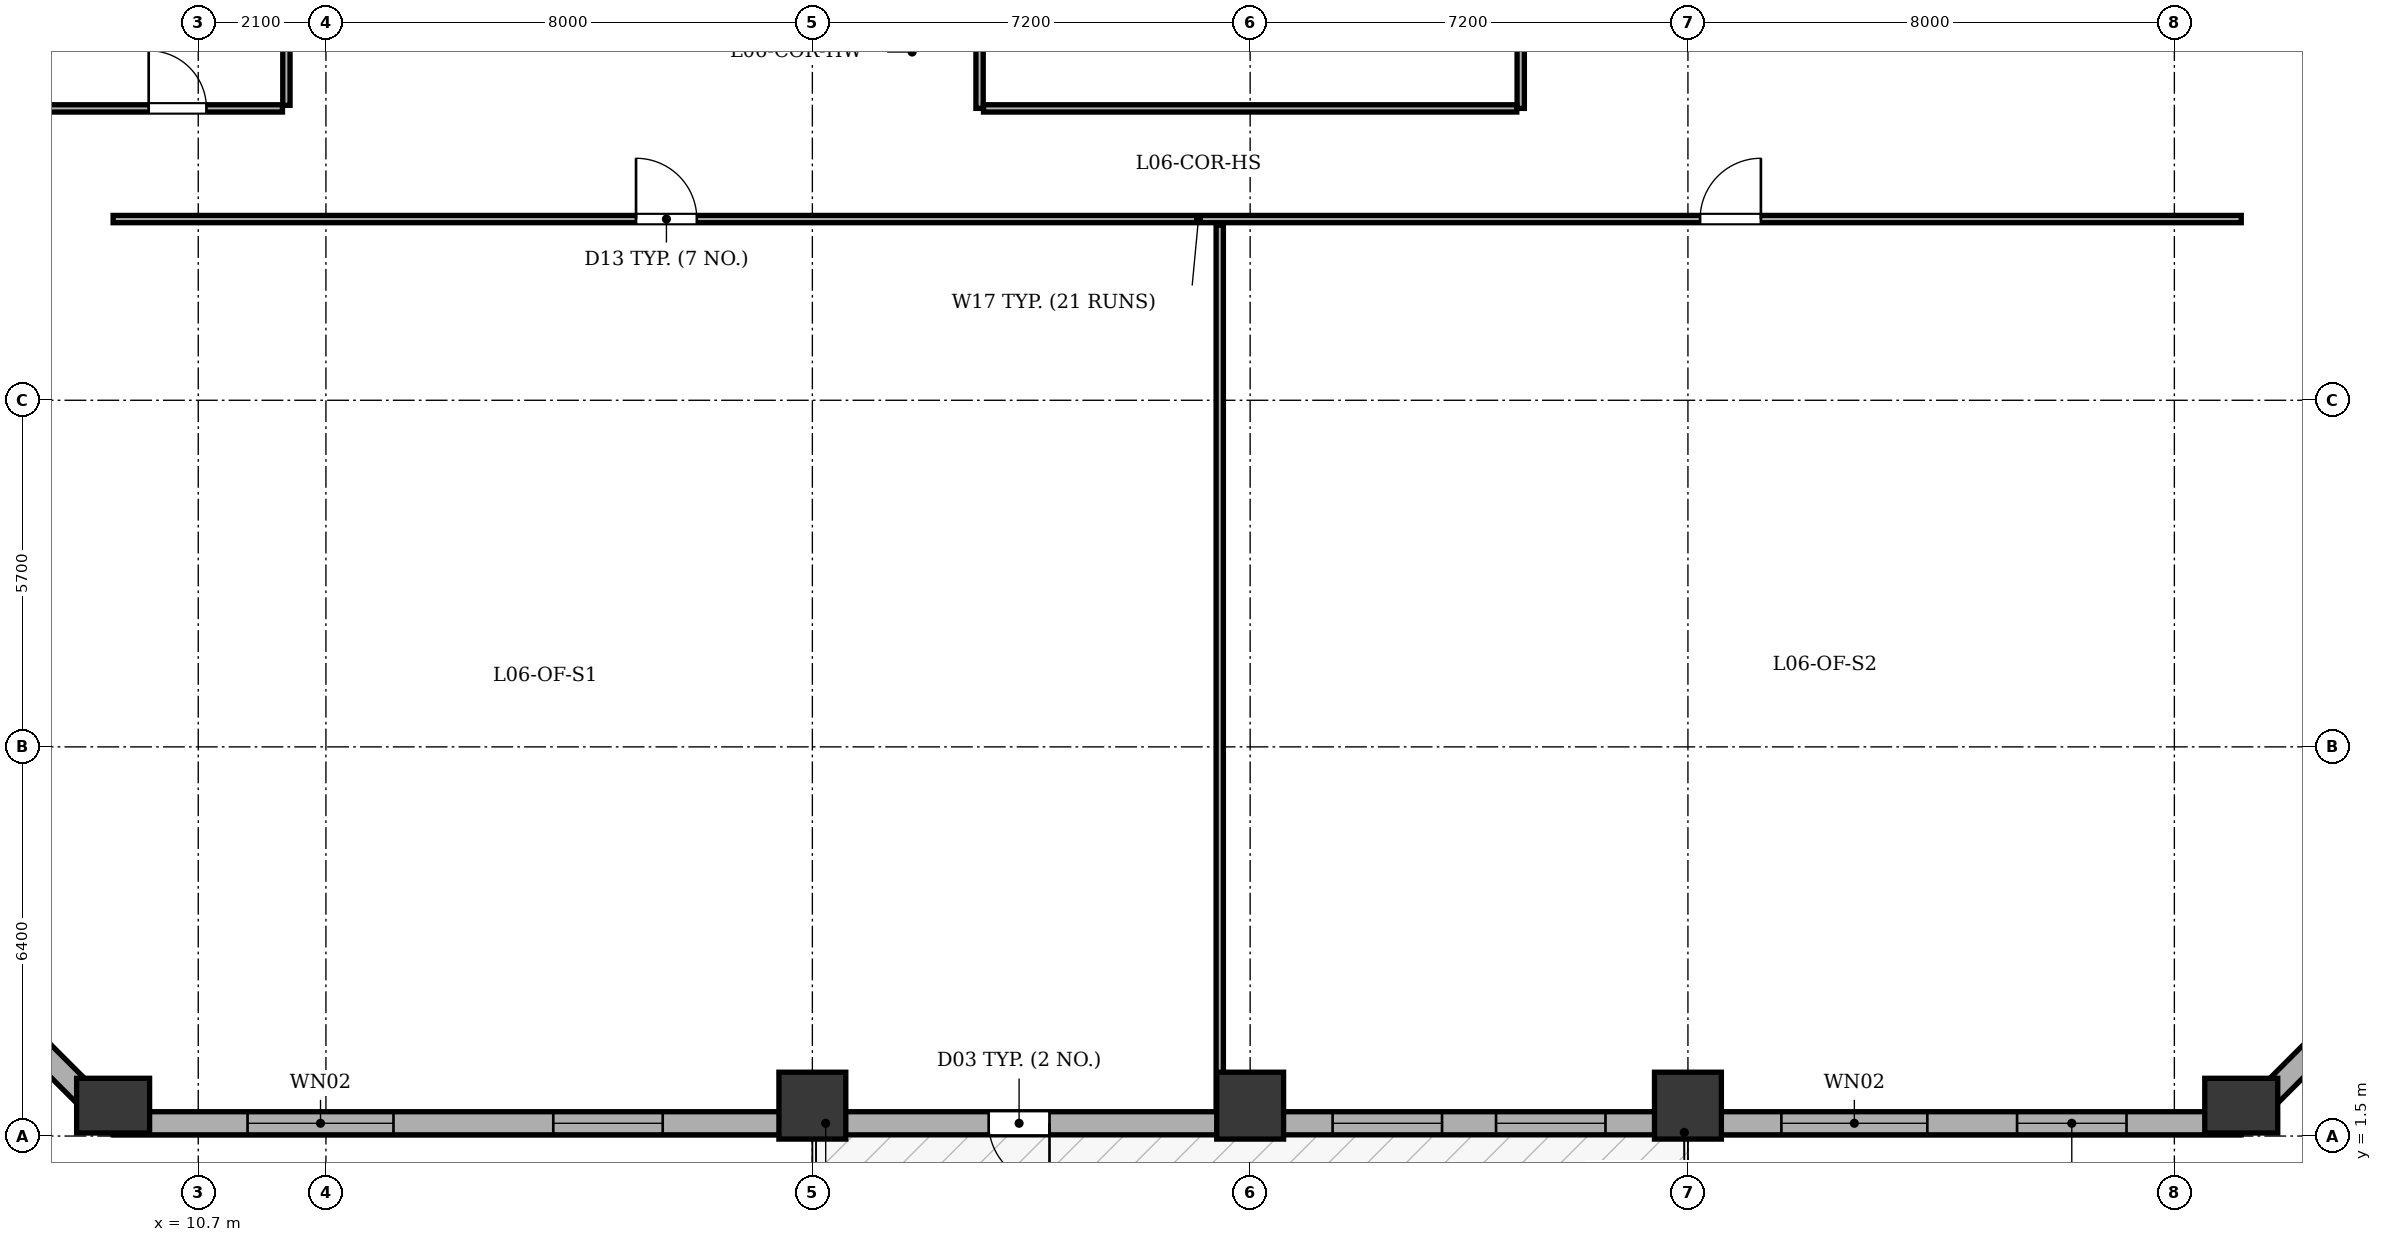
"""IFC4 building model, lengths in metres.
Left out: names, types, materials, properties, quantities, classifications, styles, units other than length and angle.
Written with IfcOpenShell. Run it as: python <this file> out.ifc"""

import sys

from ifc_helpers import new_model, si_unit, direction, frame, frame_2d, origin, origin_2d, place, context, subcontext, project, spatial, rectangle, extrude, element, fill, save


model = new_model("IFC4")
c1 = context("Model", 3, precision=1e-05, world=origin(), true_north=direction((0.0, 1.0)))
c2 = subcontext(c1, "Body", "Model", "MODEL_VIEW")
j1 = project(units=[si_unit("LENGTHUNIT", "METRE"), si_unit("PLANEANGLEUNIT", "RADIAN")], contexts=[c1])
p1 = place(None, origin())
s1 = spatial("IfcSite", under=j1, at=p1, CompositionType="ELEMENT")
p2 = place(p1, origin())
s2 = spatial("IfcBuilding", under=s1, at=p2, CompositionType="ELEMENT")
p3 = place(p2, frame((0.0, 0.0, 28.2)))
s3 = spatial("IfcBuildingStorey", under=s2, at=p3, CompositionType="ELEMENT", Elevation=28.2)
p4 = place(p3, frame((9.3, 2.0, 0.0), z_axis=(0.0, 0.0, 1.0), x_axis=(1.0, 0.0, 0.0)))
e1 = element("IfcColumn", 1, at=p4, inside=s3, PredefinedType="COLUMN", context=c2, shape_type="SweptSolid", body=[
    extrude(rectangle(XDim=0.9, YDim=1.2, at=origin_2d()), origin(), (0.0, 0.0, 1.0), 3.9),
])
for number, where, z_axis, x_axis in (
    (2, (20.8, 2.0, 0.0), (0.0, 0.0, 1.0), (1.0, 0.0, 0.0)),
    (3, (28.0, 2.0, 0.0), (0.0, 0.0, 1.0), (1.0, 0.0, 0.0)),
    (4, (35.2, 2.0, 0.0), (0.0, 0.0, 1.0), (1.0, 0.0, 0.0)),
):
    element("IfcColumn", number, at=place(p3, frame(where, z_axis=z_axis, x_axis=x_axis)), inside=s3, PredefinedType="COLUMN", context=c2, shape_type="SweptSolid", body=[
        extrude(rectangle(XDim=1.1, YDim=1.1, at=origin_2d()), origin(), (0.0, 0.0, 1.0), 3.9),
    ])
p5 = place(p3, frame((44.3, 2.0, 0.0), z_axis=(0.0, 0.0, 1.0), x_axis=(1.0, 0.0, 0.0)))
e5 = element("IfcColumn", 5, at=p5, inside=s3, PredefinedType="COLUMN", context=c2, shape_type="SweptSolid", body=[
    extrude(rectangle(XDim=0.9, YDim=1.2, at=origin_2d()), origin(), (0.0, 0.0, 1.0), 3.9),
])
p6 = place(p3, frame((44.3, 1.71, 0.0), z_axis=(0.0, 0.0, 1.0), x_axis=(-1.0, 0.0, 0.0)))
e6 = element("IfcWall", 6, at=p6, inside=s3, PredefinedType="STANDARD", context=c2, shape_type="SweptSolid", body=[
    extrude(rectangle(XDim=35.0, YDim=0.38, at=frame_2d((17.5, 0.0))), origin(), (0.0, 0.0, 1.0), 3.135),
])
p7 = place(p6, frame((19.6, 0.0, 0.0)))
e7 = element("IfcOpeningElement", 7, at=p7, cuts=e6, PredefinedType="OPENING", context=c2, shape_type="SweptSolid", body=[
    extrude(rectangle(XDim=1.0, YDim=2.02, at=frame_2d((0.5, 1.01))), frame((0.0, 0.2, 0.0), z_axis=(0.0, -1.0, 0.0), x_axis=(1.0, 0.0, 0.0)), (0.0, 0.0, 1.0), 0.4),
])
p8 = place(p6, frame((1.887, 0.0, 0.8)))
e8 = element("IfcOpeningElement", 8, at=p8, cuts=e6, PredefinedType="OPENING", context=c2, shape_type="SweptSolid", body=[
    extrude(rectangle(XDim=1.8, YDim=1.9, at=frame_2d((0.9, 0.95))), frame((0.0, 0.2, 0.0), z_axis=(0.0, -1.0, 0.0), x_axis=(1.0, 0.0, 0.0)), (0.0, 0.0, 1.0), 0.4),
])
p9 = place(p6, frame((5.163, 0.0, 0.8)))
e9 = element("IfcOpeningElement", 9, at=p9, cuts=e6, PredefinedType="OPENING", context=c2, shape_type="SweptSolid", body=[
    extrude(rectangle(XDim=2.4, YDim=1.9, at=frame_2d((1.2, 0.95))), frame((0.0, 0.2, 0.0), z_axis=(0.0, -1.0, 0.0), x_axis=(1.0, 0.0, 0.0)), (0.0, 0.0, 1.0), 0.4),
])
p10 = place(p6, frame((10.456, 0.0, 0.8)))
e10 = element("IfcOpeningElement", 10, at=p10, cuts=e6, PredefinedType="OPENING", context=c2, shape_type="SweptSolid", body=[
    extrude(rectangle(XDim=1.8, YDim=1.9, at=frame_2d((0.9, 0.95))), frame((0.0, 0.2, 0.0), z_axis=(0.0, -1.0, 0.0), x_axis=(1.0, 0.0, 0.0)), (0.0, 0.0, 1.0), 0.4),
])
p11 = place(p6, frame((13.144, 0.0, 0.8)))
e11 = element("IfcOpeningElement", 11, at=p11, cuts=e6, PredefinedType="OPENING", context=c2, shape_type="SweptSolid", body=[
    extrude(rectangle(XDim=1.8, YDim=1.9, at=frame_2d((0.9, 0.95))), frame((0.0, 0.2, 0.0), z_axis=(0.0, -1.0, 0.0), x_axis=(1.0, 0.0, 0.0)), (0.0, 0.0, 1.0), 0.4),
])
p12 = place(p6, frame((25.961, 0.0, 0.8)))
e12 = element("IfcOpeningElement", 12, at=p12, cuts=e6, PredefinedType="OPENING", context=c2, shape_type="SweptSolid", body=[
    extrude(rectangle(XDim=1.8, YDim=1.9, at=frame_2d((0.9, 0.95))), frame((0.0, 0.2, 0.0), z_axis=(0.0, -1.0, 0.0), x_axis=(1.0, 0.0, 0.0)), (0.0, 0.0, 1.0), 0.4),
])
p13 = place(p6, frame((30.389, 0.0, 0.8)))
e13 = element("IfcOpeningElement", 13, at=p13, cuts=e6, PredefinedType="OPENING", context=c2, shape_type="SweptSolid", body=[
    extrude(rectangle(XDim=2.4, YDim=1.9, at=frame_2d((1.2, 0.95))), frame((0.0, 0.2, 0.0), z_axis=(0.0, -1.0, 0.0), x_axis=(1.0, 0.0, 0.0)), (0.0, 0.0, 1.0), 0.4),
])
p14 = place(p3, frame((9.3, 1.71, 0.0), z_axis=(0.0, 0.0, 1.0), x_axis=(-0.707106781187, 0.707106781187, 0.0)))
e14 = element("IfcWall", 14, at=p14, inside=s3, PredefinedType="STANDARD", context=c2, shape_type="SweptSolid", body=[
    extrude(rectangle(XDim=6.774, YDim=0.38, at=frame_2d((3.387, 0.0))), origin(), (0.0, 0.0, 1.0), 3.135),
])
p15 = place(p14, frame((2.687, 0.0, 0.8)))
e15 = element("IfcOpeningElement", 15, at=p15, cuts=e14, PredefinedType="OPENING", context=c2, shape_type="SweptSolid", body=[
    extrude(rectangle(XDim=1.4, YDim=1.65, at=frame_2d((0.7, 0.825))), frame((0.0, 0.2, 0.0), z_axis=(0.0, -1.0, 0.0), x_axis=(1.0, 0.0, 0.0)), (0.0, 0.0, 1.0), 0.4),
])
p16 = place(p3, frame((49.09, 6.5, 0.0), z_axis=(0.0, 0.0, 1.0), x_axis=(-0.707106781187, -0.707106781187, 0.0)))
e16 = element("IfcWall", 16, at=p16, inside=s3, PredefinedType="STANDARD", context=c2, shape_type="SweptSolid", body=[
    extrude(rectangle(XDim=6.774, YDim=0.38, at=frame_2d((3.387, 0.0))), origin(), (0.0, 0.0, 1.0), 3.135),
])
p17 = place(p16, frame((2.687, 0.0, 0.8)))
e17 = element("IfcOpeningElement", 17, at=p17, cuts=e16, PredefinedType="OPENING", context=c2, shape_type="SweptSolid", body=[
    extrude(rectangle(XDim=1.4, YDim=1.65, at=frame_2d((0.7, 0.825))), frame((0.0, 0.2, 0.0), z_axis=(0.0, -1.0, 0.0), x_axis=(1.0, 0.0, 0.0)), (0.0, 0.0, 1.0), 0.4),
])
for number, where, z_axis, x_axis in (
    (18, (23.55, 18.4, 0.0), (0.0, 0.0, 1.0), (0.0, 1.0, 0.0)),
    (19, (32.45, 18.4, 0.0), (0.0, 0.0, 1.0), (0.0, 1.0, 0.0)),
):
    element("IfcWall", number, at=place(p3, frame(where, z_axis=z_axis, x_axis=x_axis)), inside=s3, PredefinedType="PARTITIONING", context=c2, shape_type="SweptSolid", body=[
        extrude(rectangle(XDim=3.485, YDim=0.12, at=frame_2d((1.743, 0.0))), origin(), (0.0, 0.0, 1.0), 3.6),
    ])
p18 = place(p3, frame((23.615, 18.4, 0.0), z_axis=(0.0, 0.0, 1.0), x_axis=(1.0, 0.0, 0.0)))
e20 = element("IfcWall", 20, at=p18, inside=s3, PredefinedType="PARTITIONING", context=c2, shape_type="SweptSolid", body=[
    extrude(rectangle(XDim=8.77, YDim=0.12, at=frame_2d((4.385, 0.0))), origin(), (0.0, 0.0, 1.0), 3.6),
])
p19 = place(p3, frame((9.3, 16.58, 0.0), z_axis=(0.0, 0.0, 1.0), x_axis=(1.0, 0.0, 0.0)))
e21 = element("IfcWall", 21, at=p19, inside=s3, PredefinedType="PARTITIONING", context=c2, shape_type="SweptSolid", body=[
    extrude(rectangle(XDim=35.0, YDim=0.12, at=frame_2d((17.5, 0.0))), origin(), (0.0, 0.0, 1.0), 3.6),
])
p20 = place(p19, frame((8.6, 0.0, 0.0)))
e22 = element("IfcOpeningElement", 22, at=p20, cuts=e21, PredefinedType="OPENING", context=c2, shape_type="SweptSolid", body=[
    extrude(rectangle(XDim=1.0, YDim=2.1, at=frame_2d((0.5, 1.05))), frame((0.0, 0.07, 0.0), z_axis=(0.0, -1.0, 0.0), x_axis=(1.0, 0.0, 0.0)), (0.0, 0.0, 1.0), 0.14),
])
p21 = place(p19, frame((26.1, 0.0, 0.0)))
e23 = element("IfcOpeningElement", 23, at=p21, cuts=e21, PredefinedType="OPENING", context=c2, shape_type="SweptSolid", body=[
    extrude(rectangle(XDim=1.0, YDim=2.1, at=frame_2d((0.5, 1.05))), frame((0.0, 0.07, 0.0), z_axis=(0.0, -1.0, 0.0), x_axis=(1.0, 0.0, 0.0)), (0.0, 0.0, 1.0), 0.14),
])
p22 = place(p3, frame((27.5, 1.905, 0.0), z_axis=(0.0, 0.0, 1.0), x_axis=(0.0, 1.0, 0.0)))
e24 = element("IfcWall", 24, at=p22, inside=s3, PredefinedType="PARTITIONING", context=c2, shape_type="SweptSolid", body=[
    extrude(rectangle(XDim=14.575, YDim=0.12, at=frame_2d((7.288, 0.0))), origin(), (0.0, 0.0, 1.0), 3.6),
])
p23 = place(p3, frame((12.15, 18.45, 0.0), z_axis=(0.0, 0.0, 1.0), x_axis=(0.0, 1.0, 0.0)))
e25 = element("IfcWall", 25, at=p23, inside=s3, PredefinedType="PARTITIONING", context=c2, shape_type="SweptSolid", body=[
    extrude(rectangle(XDim=17.5, YDim=0.12, at=frame_2d((8.75, 0.0))), origin(), (0.0, 0.0, 1.0), 3.6),
])
p24 = place(p3, frame((4.705, 18.4, 0.0), z_axis=(0.0, 0.0, 1.0), x_axis=(1.0, 0.0, 0.0)))
e26 = element("IfcWall", 26, at=p24, inside=s3, PredefinedType="PARTITIONING", context=c2, shape_type="SweptSolid", body=[
    extrude(rectangle(XDim=7.38, YDim=0.12, at=frame_2d((3.69, 0.0))), origin(), (0.0, 0.0, 1.0), 3.6),
])
p25 = place(p24, frame((5.18, 0.0, 0.0)))
e27 = element("IfcOpeningElement", 27, at=p25, cuts=e26, PredefinedType="OPENING", context=c2, shape_type="SweptSolid", body=[
    extrude(rectangle(XDim=0.95, YDim=2.1, at=frame_2d((0.475, 1.05))), frame((0.0, 0.07, 0.0), z_axis=(0.0, -1.0, 0.0), x_axis=(1.0, 0.0, 0.0)), (0.0, 0.0, 1.0), 0.14),
])
p26 = place(p7, origin())
e28 = element("IfcDoor", 28, at=p26, inside=s3, OperationType="SINGLE_SWING_LEFT", PredefinedType="DOOR", context=c2, shape_type="SweptSolid", body=[
    extrude(rectangle(XDim=1.0, YDim=2.02, at=frame_2d((0.5, 1.01))), frame((0.0, 0.025, 0.0), z_axis=(0.0, -1.0, 0.0), x_axis=(1.0, 0.0, 0.0)), (0.0, 0.0, 1.0), 0.05),
])
fill(e7, e28)
p27 = place(p8, origin())
e29 = element("IfcWindow", 29, at=p27, inside=s3, PartitioningType="SINGLE_PANEL", PredefinedType="WINDOW", context=c2, shape_type="SweptSolid", body=[
    extrude(rectangle(XDim=1.8, YDim=1.9, at=frame_2d((0.9, 0.95))), frame((0.0, -0.01, 0.0), z_axis=(0.0, -1.0, 0.0), x_axis=(1.0, 0.0, 0.0)), (0.0, 0.0, 1.0), 0.06),
])
fill(e8, e29)
p28 = place(p9, origin())
e30 = element("IfcWindow", 30, at=p28, inside=s3, PartitioningType="SINGLE_PANEL", PredefinedType="WINDOW", context=c2, shape_type="SweptSolid", body=[
    extrude(rectangle(XDim=2.4, YDim=1.9, at=frame_2d((1.2, 0.95))), frame((0.0, -0.01, 0.0), z_axis=(0.0, -1.0, 0.0), x_axis=(1.0, 0.0, 0.0)), (0.0, 0.0, 1.0), 0.06),
])
fill(e9, e30)
p29 = place(p10, origin())
e31 = element("IfcWindow", 31, at=p29, inside=s3, PartitioningType="SINGLE_PANEL", PredefinedType="WINDOW", context=c2, shape_type="SweptSolid", body=[
    extrude(rectangle(XDim=1.8, YDim=1.9, at=frame_2d((0.9, 0.95))), frame((0.0, -0.01, 0.0), z_axis=(0.0, -1.0, 0.0), x_axis=(1.0, 0.0, 0.0)), (0.0, 0.0, 1.0), 0.06),
])
fill(e10, e31)
p30 = place(p11, origin())
e32 = element("IfcWindow", 32, at=p30, inside=s3, PartitioningType="SINGLE_PANEL", PredefinedType="WINDOW", context=c2, shape_type="SweptSolid", body=[
    extrude(rectangle(XDim=1.8, YDim=1.9, at=frame_2d((0.9, 0.95))), frame((0.0, -0.01, 0.0), z_axis=(0.0, -1.0, 0.0), x_axis=(1.0, 0.0, 0.0)), (0.0, 0.0, 1.0), 0.06),
])
fill(e11, e32)
p31 = place(p12, origin())
e33 = element("IfcWindow", 33, at=p31, inside=s3, PartitioningType="SINGLE_PANEL", PredefinedType="WINDOW", context=c2, shape_type="SweptSolid", body=[
    extrude(rectangle(XDim=1.8, YDim=1.9, at=frame_2d((0.9, 0.95))), frame((0.0, -0.01, 0.0), z_axis=(0.0, -1.0, 0.0), x_axis=(1.0, 0.0, 0.0)), (0.0, 0.0, 1.0), 0.06),
])
fill(e12, e33)
p32 = place(p13, origin())
e34 = element("IfcWindow", 34, at=p32, inside=s3, PartitioningType="SINGLE_PANEL", PredefinedType="WINDOW", context=c2, shape_type="SweptSolid", body=[
    extrude(rectangle(XDim=2.4, YDim=1.9, at=frame_2d((1.2, 0.95))), frame((0.0, -0.01, 0.0), z_axis=(0.0, -1.0, 0.0), x_axis=(1.0, 0.0, 0.0)), (0.0, 0.0, 1.0), 0.06),
])
fill(e13, e34)
p33 = place(p20, origin())
e35 = element("IfcDoor", 35, at=p33, inside=s3, OperationType="SINGLE_SWING_LEFT", PredefinedType="DOOR", context=c2, shape_type="SweptSolid", body=[
    extrude(rectangle(XDim=1.0, YDim=2.1, at=frame_2d((0.5, 1.05))), frame((0.0, 0.025, 0.0), z_axis=(0.0, -1.0, 0.0), x_axis=(1.0, 0.0, 0.0)), (0.0, 0.0, 1.0), 0.05),
])
fill(e22, e35)
p34 = place(p21, origin())
e36 = element("IfcDoor", 36, at=p34, inside=s3, OperationType="SINGLE_SWING_RIGHT", PredefinedType="DOOR", context=c2, shape_type="SweptSolid", body=[
    extrude(rectangle(XDim=1.0, YDim=2.1, at=frame_2d((0.5, 1.05))), frame((0.0, 0.025, 0.0), z_axis=(0.0, -1.0, 0.0), x_axis=(1.0, 0.0, 0.0)), (0.0, 0.0, 1.0), 0.05),
])
fill(e23, e36)
p35 = place(p25, origin())
e37 = element("IfcDoor", 37, at=p35, inside=s3, OperationType="SINGLE_SWING_LEFT", PredefinedType="DOOR", context=c2, shape_type="SweptSolid", body=[
    extrude(rectangle(XDim=0.95, YDim=2.1, at=frame_2d((0.475, 1.05))), frame((0.0, 0.025, 0.0), z_axis=(0.0, -1.0, 0.0), x_axis=(1.0, 0.0, 0.0)), (0.0, 0.0, 1.0), 0.05),
])
fill(e27, e37)
save(model, sys.argv[1])
